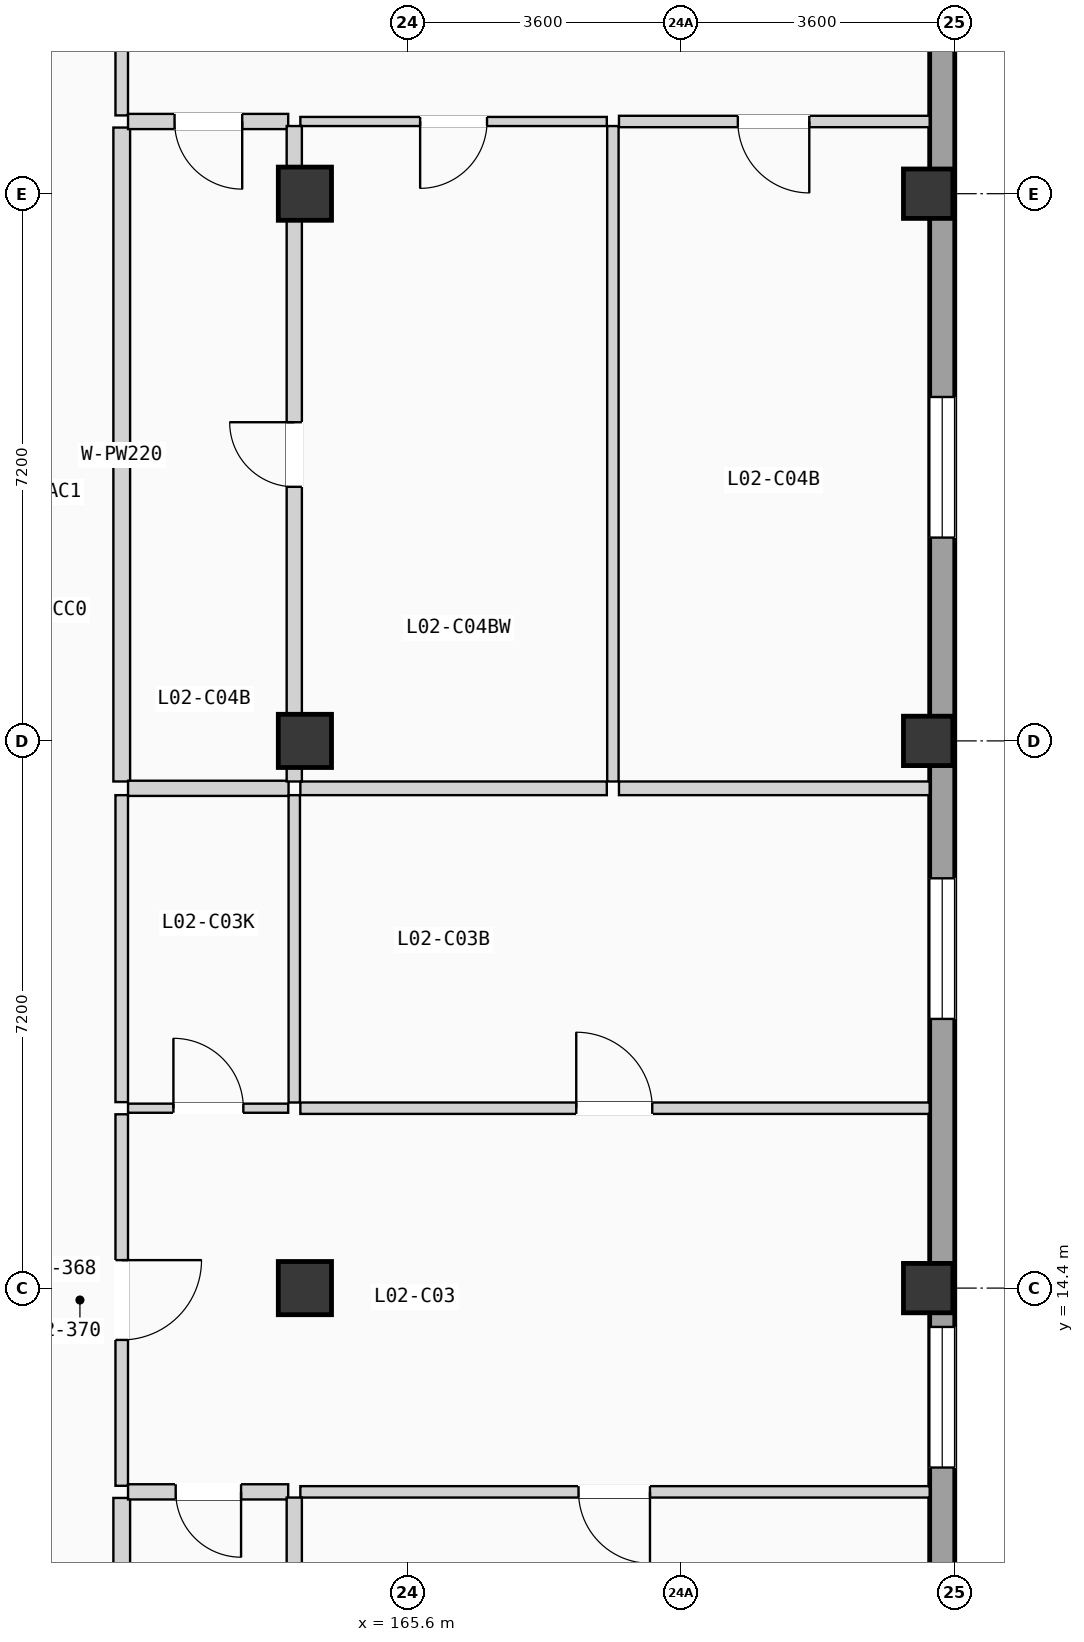
"""IFC4 building model, lengths in metres.
Left out: names, types, materials, properties, quantities, classifications, styles, units other than length and angle.
Written with IfcOpenShell. Run it as: python <this file> out.ifc"""

import sys

from ifc_helpers import new_model, si_unit, direction, frame, frame_2d, origin, origin_2d, place, context, subcontext, project, spatial, rectangle, extrude, element, fill, save


model = new_model("IFC4")
c1 = context("Model", 3, precision=1e-05, world=origin(), true_north=direction((0.0, 1.0)))
c2 = subcontext(c1, "Body", "Model", "MODEL_VIEW")
j1 = project(units=[si_unit("LENGTHUNIT", "METRE"), si_unit("PLANEANGLEUNIT", "RADIAN")], contexts=[c1])
p1 = place(None, origin())
s1 = spatial("IfcSite", under=j1, at=p1, CompositionType="ELEMENT")
p2 = place(p1, origin())
s2 = spatial("IfcBuilding", under=s1, at=p2, CompositionType="ELEMENT")
p3 = place(p2, frame((0.0, 0.0, 8.575)))
s3 = spatial("IfcBuildingStorey", under=s2, at=p3, CompositionType="ELEMENT", Elevation=8.575)
for number, where, z_axis, x_axis in (
    (1, (164.25, 14.4, 0.0), (0.0, 0.0, 1.0), (1.0, 0.0, 0.0)),
    (2, (164.25, 21.6, 0.0), (0.0, 0.0, 1.0), (1.0, 0.0, 0.0)),
    (3, (164.25, 28.8, 0.0), (0.0, 0.0, 1.0), (1.0, 0.0, 0.0)),
):
    element("IfcColumn", number, at=place(p3, frame(where, z_axis=z_axis, x_axis=x_axis)), inside=s3, PredefinedType="COLUMN", context=c2, shape_type="SweptSolid", body=[
        extrude(rectangle(XDim=0.7, YDim=0.7, at=origin_2d()), origin(), (0.0, 0.0, 1.0), 3.5),
    ])
for number, where, z_axis, x_axis in (
    (4, (172.45, 14.4, 0.0), (0.0, 0.0, 1.0), (1.0, 0.0, 0.0)),
    (5, (172.45, 21.6, 0.0), (0.0, 0.0, 1.0), (1.0, 0.0, 0.0)),
    (6, (172.45, 28.8, 0.0), (0.0, 0.0, 1.0), (1.0, 0.0, 0.0)),
):
    element("IfcColumn", number, at=place(p3, frame(where, z_axis=z_axis, x_axis=x_axis)), inside=s3, PredefinedType="COLUMN", context=c2, shape_type="SweptSolid", body=[
        extrude(rectangle(XDim=0.65, YDim=0.65, at=origin_2d()), origin(), (0.0, 0.0, 1.0), 3.5),
    ])
p4 = place(p3, frame((172.635, 0.33, 0.0), z_axis=(0.0, 0.0, 1.0), x_axis=(0.0, 1.0, 0.0)))
e7 = element("IfcWall", 7, at=p4, inside=s3, PredefinedType="SOLIDWALL", context=c2, shape_type="SweptSolid", body=[
    extrude(rectangle(XDim=49.74, YDim=0.33, at=frame_2d((24.87, 0.0))), origin(), (0.0, 0.0, 1.0), 3.24),
])
p5 = place(p4, frame((11.709, 0.0, 0.9)))
e8 = element("IfcOpeningElement", 8, at=p5, cuts=e7, PredefinedType="OPENING", context=c2, shape_type="SweptSolid", body=[
    extrude(rectangle(XDim=1.85, YDim=1.2, at=frame_2d((0.925, 0.6))), frame((0.0, 0.175, 0.0), z_axis=(0.0, -1.0, 0.0), x_axis=(1.0, 0.0, 0.0)), (0.0, 0.0, 1.0), 0.35),
])
p6 = place(p4, frame((8.364, 0.0, 0.9)))
e9 = element("IfcOpeningElement", 9, at=p6, cuts=e7, PredefinedType="OPENING", context=c2, shape_type="SweptSolid", body=[
    extrude(rectangle(XDim=1.85, YDim=1.35, at=frame_2d((0.925, 0.675))), frame((0.0, 0.175, 0.0), z_axis=(0.0, -1.0, 0.0), x_axis=(1.0, 0.0, 0.0)), (0.0, 0.0, 1.0), 0.35),
])
p7 = place(p4, frame((17.612, 0.0, 0.9)))
e10 = element("IfcOpeningElement", 10, at=p7, cuts=e7, PredefinedType="OPENING", context=c2, shape_type="SweptSolid", body=[
    extrude(rectangle(XDim=1.85, YDim=1.5, at=frame_2d((0.925, 0.75))), frame((0.0, 0.175, 0.0), z_axis=(0.0, -1.0, 0.0), x_axis=(1.0, 0.0, 0.0)), (0.0, 0.0, 1.0), 0.35),
])
p8 = place(p4, frame((31.145, 0.0, 0.9)))
e11 = element("IfcOpeningElement", 11, at=p8, cuts=e7, PredefinedType="OPENING", context=c2, shape_type="SweptSolid", body=[
    extrude(rectangle(XDim=1.85, YDim=1.65, at=frame_2d((0.925, 0.825))), frame((0.0, 0.175, 0.0), z_axis=(0.0, -1.0, 0.0), x_axis=(1.0, 0.0, 0.0)), (0.0, 0.0, 1.0), 0.35),
])
p9 = place(p4, frame((23.945, 0.0, 0.755)))
e12 = element("IfcOpeningElement", 12, at=p9, cuts=e7, PredefinedType="OPENING", context=c2, shape_type="SweptSolid", body=[
    extrude(rectangle(XDim=1.85, YDim=1.8, at=frame_2d((0.925, 0.9))), frame((0.0, 0.175, 0.0), z_axis=(0.0, -1.0, 0.0), x_axis=(1.0, 0.0, 0.0)), (0.0, 0.0, 1.0), 0.35),
])
p10 = place(p4, frame((38.205, 0.0, 0.9)))
e13 = element("IfcOpeningElement", 13, at=p10, cuts=e7, PredefinedType="OPENING", context=c2, shape_type="SweptSolid", body=[
    extrude(rectangle(XDim=2.0, YDim=1.2, at=frame_2d((1.0, 0.6))), frame((0.0, 0.175, 0.0), z_axis=(0.0, -1.0, 0.0), x_axis=(1.0, 0.0, 0.0)), (0.0, 0.0, 1.0), 0.35),
])
p11 = place(p3, frame((161.84, 11.799, 0.0), z_axis=(0.0, 0.0, 1.0), x_axis=(0.0, 1.0, 0.0)))
e14 = element("IfcWall", 14, at=p11, inside=s3, PredefinedType="PARTITIONING", context=c2, shape_type="SweptSolid", body=[
    extrude(rectangle(XDim=4.888, YDim=0.165, at=frame_2d((2.444, 0.0))), origin(), (0.0, 0.0, 1.0), 3.22),
])
p12 = place(p11, frame((1.919, 0.0, 0.0)))
e15 = element("IfcOpeningElement", 15, at=p12, cuts=e14, PredefinedType="OPENING", context=c2, shape_type="SweptSolid", body=[
    extrude(rectangle(XDim=1.05, YDim=2.13, at=frame_2d((0.525, 1.065))), frame((0.0, 0.093, 0.0), z_axis=(0.0, -1.0, 0.0), x_axis=(1.0, 0.0, 0.0)), (0.0, 0.0, 1.0), 0.185),
])
p13 = place(p3, frame((161.84, 7.575, 0.0), z_axis=(0.0, 0.0, 1.0), x_axis=(0.0, 1.0, 0.0)))
e16 = element("IfcWall", 16, at=p13, inside=s3, PredefinedType="PLUMBINGWALL", context=c2, shape_type="SweptSolid", body=[
    extrude(rectangle(XDim=4.064, YDim=0.22, at=frame_2d((2.032, 0.0))), origin(), (0.0, 0.0, 1.0), 3.22),
])
p14 = place(p3, frame((161.84, 16.847, 0.0), z_axis=(0.0, 0.0, 1.0), x_axis=(0.0, 1.0, 0.0)))
e17 = element("IfcWall", 17, at=p14, inside=s3, PredefinedType="PARTITIONING", context=c2, shape_type="SweptSolid", body=[
    extrude(rectangle(XDim=4.039, YDim=0.165, at=frame_2d((2.02, 0.0))), origin(), (0.0, 0.0, 1.0), 3.22),
])
p15 = place(p3, frame((161.84, 29.83, 0.0), z_axis=(0.0, 0.0, 1.0), x_axis=(0.0, 1.0, 0.0)))
e18 = element("IfcWall", 18, at=p15, inside=s3, PredefinedType="PARTITIONING", context=c2, shape_type="SweptSolid", body=[
    extrude(rectangle(XDim=5.14, YDim=0.165, at=frame_2d((2.57, 0.0))), origin(), (0.0, 0.0, 1.0), 3.22),
])
p16 = place(p15, frame((2.045, 0.0, 0.0)))
e19 = element("IfcOpeningElement", 19, at=p16, cuts=e18, PredefinedType="OPENING", context=c2, shape_type="SweptSolid", body=[
    extrude(rectangle(XDim=1.05, YDim=2.13, at=frame_2d((0.525, 1.065))), frame((0.0, 0.093, 0.0), z_axis=(0.0, -1.0, 0.0), x_axis=(1.0, 0.0, 0.0)), (0.0, 0.0, 1.0), 0.185),
])
p17 = place(p3, frame((161.84, 21.066, 0.0), z_axis=(0.0, 0.0, 1.0), x_axis=(0.0, 1.0, 0.0)))
e20 = element("IfcWall", 20, at=p17, inside=s3, PredefinedType="PLUMBINGWALL", context=c2, shape_type="SweptSolid", body=[
    extrude(rectangle(XDim=8.604, YDim=0.22, at=frame_2d((4.302, 0.0))), origin(), (0.0, 0.0, 1.0), 3.22),
])
p18 = place(p3, frame((161.923, 11.719, 0.0), z_axis=(0.0, 0.0, 1.0), x_axis=(1.0, 0.0, 0.0)))
e21 = element("IfcWall", 21, at=p18, inside=s3, PredefinedType="PLUMBINGWALL", context=c2, shape_type="SweptSolid", body=[
    extrude(rectangle(XDim=2.107, YDim=0.2, at=frame_2d((1.053, 0.0))), origin(), (0.0, 0.0, 1.0), 3.22),
])
p19 = place(p18, frame((0.627, 0.0, 0.0)))
e22 = element("IfcOpeningElement", 22, at=p19, cuts=e21, PredefinedType="OPENING", context=c2, shape_type="SweptSolid", body=[
    extrude(rectangle(XDim=0.86, YDim=2.0, at=frame_2d((0.43, 1.0))), frame((0.0, 0.11, 0.0), z_axis=(0.0, -1.0, 0.0), x_axis=(1.0, 0.0, 0.0)), (0.0, 0.0, 1.0), 0.22),
])
p20 = place(p3, frame((161.923, 16.767, 0.0), z_axis=(0.0, 0.0, 1.0), x_axis=(1.0, 0.0, 0.0)))
e23 = element("IfcWall", 23, at=p20, inside=s3, PredefinedType="PARTITIONING", context=c2, shape_type="SweptSolid", body=[
    extrude(rectangle(XDim=2.107, YDim=0.12, at=frame_2d((1.053, 0.0))), origin(), (0.0, 0.0, 1.0), 3.22),
])
p21 = place(p20, frame((0.597, 0.0, 0.0)))
e24 = element("IfcOpeningElement", 24, at=p21, cuts=e23, PredefinedType="OPENING", context=c2, shape_type="SweptSolid", body=[
    extrude(rectangle(XDim=0.92, YDim=2.02, at=frame_2d((0.46, 1.01))), frame((0.0, 0.07, 0.0), z_axis=(0.0, -1.0, 0.0), x_axis=(1.0, 0.0, 0.0)), (0.0, 0.0, 1.0), 0.14),
])
p22 = place(p3, frame((164.19, 11.719, 0.0), z_axis=(0.0, 0.0, 1.0), x_axis=(1.0, 0.0, 0.0)))
e25 = element("IfcWall", 25, at=p22, inside=s3, PredefinedType="PARTITIONING", context=c2, shape_type="SweptSolid", body=[
    extrude(rectangle(XDim=8.28, YDim=0.15, at=frame_2d((4.14, 0.0))), origin(), (0.0, 0.0, 1.0), 3.22),
])
p23 = place(p22, frame((3.66, 0.0, 0.0)))
e26 = element("IfcOpeningElement", 26, at=p23, cuts=e25, PredefinedType="OPENING", context=c2, shape_type="SweptSolid", body=[
    extrude(rectangle(XDim=0.94, YDim=2.06, at=frame_2d((0.47, 1.03))), frame((0.0, 0.085, 0.0), z_axis=(0.0, -1.0, 0.0), x_axis=(1.0, 0.0, 0.0)), (0.0, 0.0, 1.0), 0.17),
])
p24 = place(p3, frame((164.19, 16.767, 0.0), z_axis=(0.0, 0.0, 1.0), x_axis=(1.0, 0.0, 0.0)))
e27 = element("IfcWall", 27, at=p24, inside=s3, PredefinedType="PARTITIONING", context=c2, shape_type="SweptSolid", body=[
    extrude(rectangle(XDim=8.28, YDim=0.15, at=frame_2d((4.14, 0.0))), origin(), (0.0, 0.0, 1.0), 3.22),
])
p25 = place(p24, frame((3.63, 0.0, 0.0)))
e28 = element("IfcOpeningElement", 28, at=p25, cuts=e27, PredefinedType="OPENING", context=c2, shape_type="SweptSolid", body=[
    extrude(rectangle(XDim=1.0, YDim=2.06, at=frame_2d((0.5, 1.03))), frame((0.0, 0.085, 0.0), z_axis=(0.0, -1.0, 0.0), x_axis=(1.0, 0.0, 0.0)), (0.0, 0.0, 1.0), 0.17),
])
p26 = place(p3, frame((164.11, 7.575, 0.0), z_axis=(0.0, 0.0, 1.0), x_axis=(0.0, 1.0, 0.0)))
e29 = element("IfcWall", 29, at=p26, inside=s3, PredefinedType="PLUMBINGWALL", context=c2, shape_type="SweptSolid", body=[
    extrude(rectangle(XDim=4.069, YDim=0.2, at=frame_2d((2.035, 0.0))), origin(), (0.0, 0.0, 1.0), 3.22),
])
p27 = place(p3, frame((164.11, 16.842, 0.0), z_axis=(0.0, 0.0, 1.0), x_axis=(0.0, 1.0, 0.0)))
e30 = element("IfcWall", 30, at=p27, inside=s3, PredefinedType="PARTITIONING", context=c2, shape_type="SweptSolid", body=[
    extrude(rectangle(XDim=4.044, YDim=0.15, at=frame_2d((2.022, 0.0))), origin(), (0.0, 0.0, 1.0), 3.22),
])
p28 = place(p3, frame((161.923, 20.976, 0.0), z_axis=(0.0, 0.0, 1.0), x_axis=(1.0, 0.0, 0.0)))
e31 = element("IfcWall", 31, at=p28, inside=s3, PredefinedType="PLUMBINGWALL", context=c2, shape_type="SweptSolid", body=[
    extrude(rectangle(XDim=2.112, YDim=0.2, at=frame_2d((1.056, 0.0))), origin(), (0.0, 0.0, 1.0), 3.22),
])
p29 = place(p3, frame((168.382, 20.976, 0.0), z_axis=(0.0, 0.0, 1.0), x_axis=(1.0, 0.0, 0.0)))
e32 = element("IfcWall", 32, at=p29, inside=s3, PredefinedType="PARTITIONING", context=c2, shape_type="SweptSolid", body=[
    extrude(rectangle(XDim=4.088, YDim=0.18, at=frame_2d((2.044, 0.0))), origin(), (0.0, 0.0, 1.0), 3.22),
])
p30 = place(p3, frame((164.19, 20.976, 0.0), z_axis=(0.0, 0.0, 1.0), x_axis=(1.0, 0.0, 0.0)))
e33 = element("IfcWall", 33, at=p30, inside=s3, PredefinedType="PARTITIONING", context=c2, shape_type="SweptSolid", body=[
    extrude(rectangle(XDim=4.032, YDim=0.18, at=frame_2d((2.016, 0.0))), origin(), (0.0, 0.0, 1.0), 3.22),
])
p31 = place(p3, frame((161.923, 29.75, 0.0), z_axis=(0.0, 0.0, 1.0), x_axis=(1.0, 0.0, 0.0)))
e34 = element("IfcWall", 34, at=p31, inside=s3, PredefinedType="PLUMBINGWALL", context=c2, shape_type="SweptSolid", body=[
    extrude(rectangle(XDim=2.107, YDim=0.2, at=frame_2d((1.053, 0.0))), origin(), (0.0, 0.0, 1.0), 3.22),
])
p32 = place(p31, frame((0.612, 0.0, 0.0)))
e35 = element("IfcOpeningElement", 35, at=p32, cuts=e34, PredefinedType="OPENING", context=c2, shape_type="SweptSolid", body=[
    extrude(rectangle(XDim=0.89, YDim=2.03, at=frame_2d((0.445, 1.015))), frame((0.0, 0.11, 0.0), z_axis=(0.0, -1.0, 0.0), x_axis=(1.0, 0.0, 0.0)), (0.0, 0.0, 1.0), 0.22),
])
p33 = place(p3, frame((168.382, 29.75, 0.0), z_axis=(0.0, 0.0, 1.0), x_axis=(1.0, 0.0, 0.0)))
e36 = element("IfcWall", 36, at=p33, inside=s3, PredefinedType="PARTITIONING", context=c2, shape_type="SweptSolid", body=[
    extrude(rectangle(XDim=4.088, YDim=0.15, at=frame_2d((2.044, 0.0))), origin(), (0.0, 0.0, 1.0), 3.22),
])
p34 = place(p33, frame((1.564, 0.0, 0.0)))
e37 = element("IfcOpeningElement", 37, at=p34, cuts=e36, PredefinedType="OPENING", context=c2, shape_type="SweptSolid", body=[
    extrude(rectangle(XDim=0.94, YDim=2.06, at=frame_2d((0.47, 1.03))), frame((0.0, 0.085, 0.0), z_axis=(0.0, -1.0, 0.0), x_axis=(1.0, 0.0, 0.0)), (0.0, 0.0, 1.0), 0.17),
])
p35 = place(p3, frame((164.19, 29.75, 0.0), z_axis=(0.0, 0.0, 1.0), x_axis=(1.0, 0.0, 0.0)))
e38 = element("IfcWall", 38, at=p35, inside=s3, PredefinedType="PARTITIONING", context=c2, shape_type="SweptSolid", body=[
    extrude(rectangle(XDim=4.032, YDim=0.12, at=frame_2d((2.016, 0.0))), origin(), (0.0, 0.0, 1.0), 3.22),
])
p36 = place(p35, frame((1.576, 0.0, 0.0)))
e39 = element("IfcOpeningElement", 39, at=p36, cuts=e38, PredefinedType="OPENING", context=c2, shape_type="SweptSolid", body=[
    extrude(rectangle(XDim=0.88, YDim=2.02, at=frame_2d((0.44, 1.01))), frame((0.0, 0.07, 0.0), z_axis=(0.0, -1.0, 0.0), x_axis=(1.0, 0.0, 0.0)), (0.0, 0.0, 1.0), 0.14),
])
p37 = place(p3, frame((164.11, 21.066, 0.0), z_axis=(0.0, 0.0, 1.0), x_axis=(0.0, 1.0, 0.0)))
e40 = element("IfcWall", 40, at=p37, inside=s3, PredefinedType="PLUMBINGWALL", context=c2, shape_type="SweptSolid", body=[
    extrude(rectangle(XDim=8.624, YDim=0.2, at=frame_2d((4.312, 0.0))), origin(), (0.0, 0.0, 1.0), 3.22),
])
p38 = place(p37, frame((3.877, 0.0, 0.0)))
e41 = element("IfcOpeningElement", 41, at=p38, cuts=e40, PredefinedType="OPENING", context=c2, shape_type="SweptSolid", body=[
    extrude(rectangle(XDim=0.85, YDim=2.01, at=frame_2d((0.425, 1.005))), frame((0.0, 0.11, 0.0), z_axis=(0.0, -1.0, 0.0), x_axis=(1.0, 0.0, 0.0)), (0.0, 0.0, 1.0), 0.22),
])
p39 = place(p3, frame((168.302, 21.066, 0.0), z_axis=(0.0, 0.0, 1.0), x_axis=(0.0, 1.0, 0.0)))
e42 = element("IfcWall", 42, at=p39, inside=s3, PredefinedType="PARTITIONING", context=c2, shape_type="SweptSolid", body=[
    extrude(rectangle(XDim=8.624, YDim=0.15, at=frame_2d((4.312, 0.0))), origin(), (0.0, 0.0, 1.0), 3.22),
])
p40 = place(p5, origin())
e43 = element("IfcWindow", 43, at=p40, inside=s3, PartitioningType="DOUBLE_PANEL_VERTICAL", PredefinedType="WINDOW", context=c2, shape_type="SweptSolid", body=[
    extrude(rectangle(XDim=1.85, YDim=1.2, at=frame_2d((0.925, 0.6))), frame((0.0, 0.03, 0.0), z_axis=(0.0, -1.0, 0.0), x_axis=(1.0, 0.0, 0.0)), (0.0, 0.0, 1.0), 0.06),
])
fill(e8, e43)
p41 = place(p7, origin())
e44 = element("IfcWindow", 44, at=p41, inside=s3, PartitioningType="DOUBLE_PANEL_VERTICAL", PredefinedType="WINDOW", context=c2, shape_type="SweptSolid", body=[
    extrude(rectangle(XDim=1.85, YDim=1.5, at=frame_2d((0.925, 0.75))), frame((0.0, 0.03, 0.0), z_axis=(0.0, -1.0, 0.0), x_axis=(1.0, 0.0, 0.0)), (0.0, 0.0, 1.0), 0.06),
])
fill(e10, e44)
p42 = place(p9, origin())
e45 = element("IfcWindow", 45, at=p42, inside=s3, PartitioningType="DOUBLE_PANEL_VERTICAL", PredefinedType="WINDOW", context=c2, shape_type="SweptSolid", body=[
    extrude(rectangle(XDim=1.85, YDim=1.8, at=frame_2d((0.925, 0.9))), frame((0.0, 0.03, 0.0), z_axis=(0.0, -1.0, 0.0), x_axis=(1.0, 0.0, 0.0)), (0.0, 0.0, 1.0), 0.06),
])
fill(e12, e45)
p43 = place(p12, frame((1.05, 0.0, 0.0), z_axis=(0.0, 0.0, 1.0), x_axis=(-1.0, 0.0, 0.0)))
e46 = element("IfcDoor", 46, at=p43, inside=s3, OperationType="SINGLE_SWING_RIGHT", PredefinedType="DOOR", context=c2, shape_type="SweptSolid", body=[
    extrude(rectangle(XDim=1.05, YDim=2.13, at=frame_2d((0.525, 1.065))), frame((0.0, 0.025, 0.0), z_axis=(0.0, -1.0, 0.0), x_axis=(1.0, 0.0, 0.0)), (0.0, 0.0, 1.0), 0.05),
])
fill(e15, e46)
p44 = place(p19, frame((0.86, 0.0, 0.0), z_axis=(0.0, 0.0, 1.0), x_axis=(-1.0, 0.0, 0.0)))
e47 = element("IfcDoor", 47, at=p44, inside=s3, OperationType="SINGLE_SWING_RIGHT", PredefinedType="DOOR", context=c2, shape_type="SweptSolid", body=[
    extrude(rectangle(XDim=0.86, YDim=2.0, at=frame_2d((0.43, 1.0))), frame((0.0, 0.025, 0.0), z_axis=(0.0, -1.0, 0.0), x_axis=(1.0, 0.0, 0.0)), (0.0, 0.0, 1.0), 0.05),
])
fill(e22, e47)
p45 = place(p21, origin())
e48 = element("IfcDoor", 48, at=p45, inside=s3, OperationType="SINGLE_SWING_LEFT", PredefinedType="DOOR", context=c2, shape_type="SweptSolid", body=[
    extrude(rectangle(XDim=0.92, YDim=2.02, at=frame_2d((0.46, 1.01))), frame((0.0, 0.025, 0.0), z_axis=(0.0, -1.0, 0.0), x_axis=(1.0, 0.0, 0.0)), (0.0, 0.0, 1.0), 0.05),
])
fill(e24, e48)
p46 = place(p23, frame((0.94, 0.0, 0.0), z_axis=(0.0, 0.0, 1.0), x_axis=(-1.0, 0.0, 0.0)))
e49 = element("IfcDoor", 49, at=p46, inside=s3, OperationType="SINGLE_SWING_RIGHT", PredefinedType="DOOR", context=c2, shape_type="SweptSolid", body=[
    extrude(rectangle(XDim=0.94, YDim=2.06, at=frame_2d((0.47, 1.03))), frame((0.0, 0.025, 0.0), z_axis=(0.0, -1.0, 0.0), x_axis=(1.0, 0.0, 0.0)), (0.0, 0.0, 1.0), 0.05),
])
fill(e26, e49)
p47 = place(p25, origin())
e50 = element("IfcDoor", 50, at=p47, inside=s3, OperationType="SINGLE_SWING_LEFT", PredefinedType="DOOR", context=c2, shape_type="SweptSolid", body=[
    extrude(rectangle(XDim=1.0, YDim=2.06, at=frame_2d((0.5, 1.03))), frame((0.0, 0.025, 0.0), z_axis=(0.0, -1.0, 0.0), x_axis=(1.0, 0.0, 0.0)), (0.0, 0.0, 1.0), 0.05),
])
fill(e28, e50)
p48 = place(p32, frame((0.89, 0.0, 0.0), z_axis=(0.0, 0.0, 1.0), x_axis=(-1.0, 0.0, 0.0)))
e51 = element("IfcDoor", 51, at=p48, inside=s3, OperationType="SINGLE_SWING_RIGHT", PredefinedType="DOOR", context=c2, shape_type="SweptSolid", body=[
    extrude(rectangle(XDim=0.89, YDim=2.03, at=frame_2d((0.445, 1.015))), frame((0.0, 0.025, 0.0), z_axis=(0.0, -1.0, 0.0), x_axis=(1.0, 0.0, 0.0)), (0.0, 0.0, 1.0), 0.05),
])
fill(e35, e51)
p49 = place(p34, frame((0.94, 0.0, 0.0), z_axis=(0.0, 0.0, 1.0), x_axis=(-1.0, 0.0, 0.0)))
e52 = element("IfcDoor", 52, at=p49, inside=s3, OperationType="SINGLE_SWING_RIGHT", PredefinedType="DOOR", context=c2, shape_type="SweptSolid", body=[
    extrude(rectangle(XDim=0.94, YDim=2.06, at=frame_2d((0.47, 1.03))), frame((0.0, 0.025, 0.0), z_axis=(0.0, -1.0, 0.0), x_axis=(1.0, 0.0, 0.0)), (0.0, 0.0, 1.0), 0.05),
])
fill(e37, e52)
p50 = place(p36, frame((0.88, 0.0, 0.0), z_axis=(0.0, 0.0, 1.0), x_axis=(-1.0, 0.0, 0.0)))
e53 = element("IfcDoor", 53, at=p50, inside=s3, OperationType="SINGLE_SWING_LEFT", PredefinedType="DOOR", context=c2, shape_type="SweptSolid", body=[
    extrude(rectangle(XDim=0.88, YDim=2.02, at=frame_2d((0.44, 1.01))), frame((0.0, 0.025, 0.0), z_axis=(0.0, -1.0, 0.0), x_axis=(1.0, 0.0, 0.0)), (0.0, 0.0, 1.0), 0.05),
])
fill(e39, e53)
p51 = place(p38, origin())
e54 = element("IfcDoor", 54, at=p51, inside=s3, OperationType="SINGLE_SWING_RIGHT", PredefinedType="DOOR", context=c2, shape_type="SweptSolid", body=[
    extrude(rectangle(XDim=0.85, YDim=2.01, at=frame_2d((0.425, 1.005))), frame((0.0, 0.025, 0.0), z_axis=(0.0, -1.0, 0.0), x_axis=(1.0, 0.0, 0.0)), (0.0, 0.0, 1.0), 0.05),
])
fill(e41, e54)
save(model, sys.argv[1])
